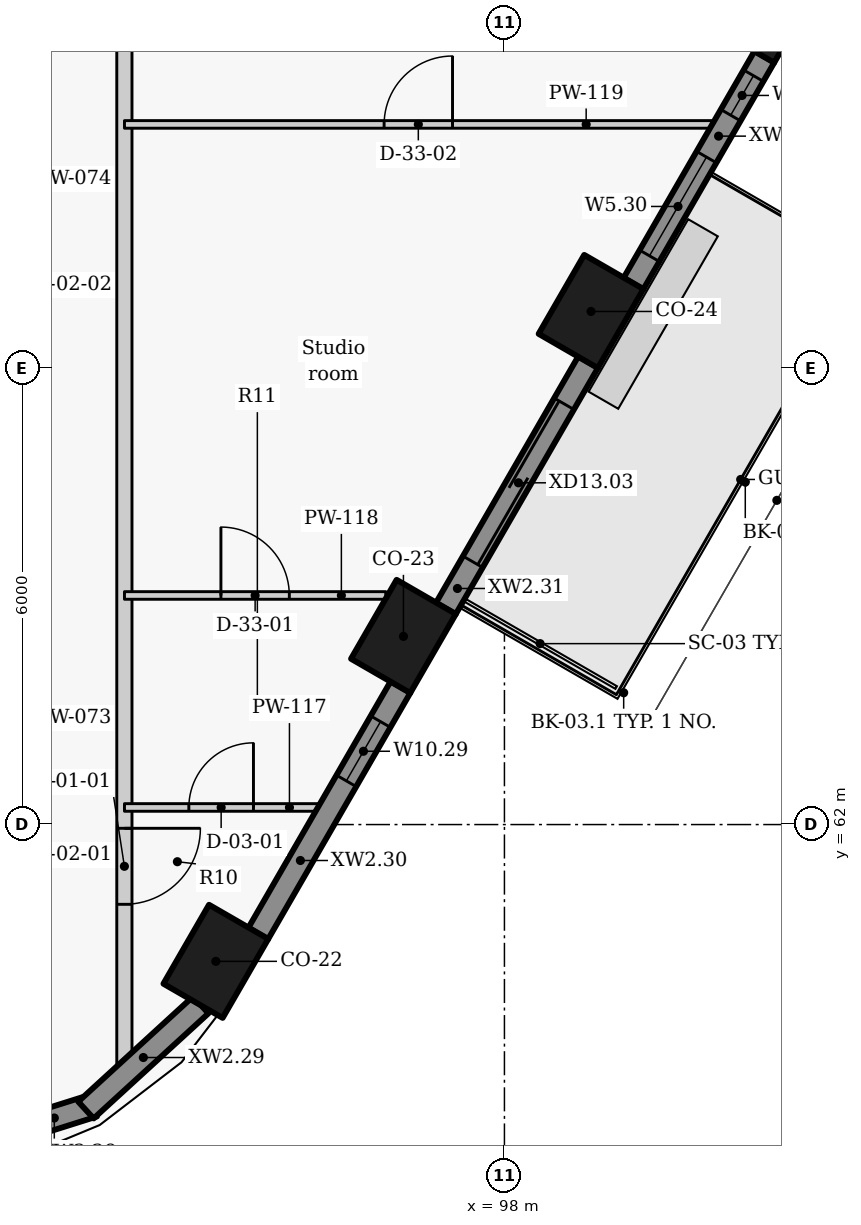
"""IFC4 building model, lengths in metres.
Left out: names, types, materials, properties, quantities, classifications, styles, units other than length and angle.
Written with IfcOpenShell. Run it as: python <this file> out.ifc"""

import sys

from ifc_helpers import new_model, si_unit, direction, frame, frame_2d, origin, origin_2d, place, context, subcontext, project, spatial, rectangle, extrude, element, fill, save


model = new_model("IFC4")
c1 = context("Model", 3, precision=1e-05, world=origin(), true_north=direction((0.0, 1.0)))
c2 = subcontext(c1, "Body", "Model", "MODEL_VIEW")
j1 = project(units=[si_unit("LENGTHUNIT", "METRE"), si_unit("PLANEANGLEUNIT", "RADIAN")], contexts=[c1])
p1 = place(None, origin())
s1 = spatial("IfcSite", under=j1, at=p1, CompositionType="ELEMENT")
p2 = place(p1, origin())
s2 = spatial("IfcBuilding", under=s1, at=p2, CompositionType="ELEMENT")
p3 = place(p2, frame((0.0, 0.0, 203.1)))
s3 = spatial("IfcBuildingStorey", under=s2, at=p3, CompositionType="ELEMENT", Elevation=203.1)
for number, where, z_axis, x_axis in (
    (1, (94.203, 60.2, 0.0), (0.0, 0.0, 1.0), (0.5, 0.866, 0.0)),
    (2, (96.671, 64.475, 0.0), (0.0, 0.0, 1.0), (0.5, 0.866, 0.0)),
    (3, (99.139, 68.75, 0.0), (0.0, 0.0, 1.0), (0.5, 0.866, 0.0)),
    (4, (101.459, 72.768, 0.0), (0.0, 0.0, 1.0), (0.5, 0.866, 0.0)),
):
    element("IfcColumn", number, at=place(p3, frame(where, z_axis=z_axis, x_axis=x_axis)), inside=s3, PredefinedType="COLUMN", context=c2, shape_type="SweptSolid", body=[
        extrude(rectangle(XDim=1.2, YDim=0.9, at=origin_2d()), origin(), (0.0, 0.0, 1.0), 3.3),
    ])
p4 = place(p3, frame((90.636, 57.685, 0.0), z_axis=(0.0, 0.0, 1.0), x_axis=(0.95368324118, 0.300812691707, 0.0)))
e5 = element("IfcWall", 5, at=p4, inside=s3, PredefinedType="SOLIDWALL", context=c2, shape_type="SweptSolid", body=[
    extrude(rectangle(XDim=2.053, YDim=0.3, at=frame_2d((1.027, 0.0))), origin(), (0.0, 0.0, 1.0), 2.425),
])
p5 = place(p4, frame((0.271, 0.0, 0.9)))
e6 = element("IfcOpeningElement", 6, at=p5, cuts=e5, PredefinedType="OPENING", context=c2, shape_type="SweptSolid", body=[
    extrude(rectangle(XDim=0.6, YDim=1.1, at=frame_2d((0.3, 0.55))), frame((0.0, 0.16, 0.0), z_axis=(0.0, -1.0, 0.0), x_axis=(1.0, 0.0, 0.0)), (0.0, 0.0, 1.0), 0.32),
])
p6 = place(p3, frame((92.494, 58.244, 0.0), z_axis=(0.0, 0.0, 1.0), x_axis=(0.73764876128, 0.675184645102, 0.0)))
e7 = element("IfcWall", 7, at=p6, inside=s3, PredefinedType="SOLIDWALL", context=c2, shape_type="SweptSolid", body=[
    extrude(rectangle(XDim=2.048, YDim=0.3, at=frame_2d((1.024, 0.0))), origin(), (0.0, 0.0, 1.0), 2.425),
])
p7 = place(p3, frame((94.761, 60.567, 0.0), z_axis=(0.0, 0.0, 1.0), x_axis=(0.499982088007, 0.866035745032, 0.0)))
e8 = element("IfcWall", 8, at=p7, inside=s3, PredefinedType="SOLIDWALL", context=c2, shape_type="SweptSolid", body=[
    extrude(rectangle(XDim=3.744, YDim=0.3, at=frame_2d((1.872, 0.0))), origin(), (0.0, 0.0, 1.0), 2.425),
])
p8 = place(p7, frame((2.319, 0.0, 1.5)))
e9 = element("IfcOpeningElement", 9, at=p8, cuts=e8, PredefinedType="OPENING", context=c2, shape_type="SweptSolid", body=[
    extrude(rectangle(XDim=0.9, YDim=0.5, at=frame_2d((0.45, 0.25))), frame((0.0, 0.16, 0.0), z_axis=(0.0, -1.0, 0.0), x_axis=(1.0, 0.0, 0.0)), (0.0, 0.0, 1.0), 0.32),
])
p9 = place(p3, frame((97.229, 64.842, 0.0), z_axis=(0.0, 0.0, 1.0), x_axis=(0.500059225181, 0.86599120741, 0.0)))
e10 = element("IfcWall", 10, at=p9, inside=s3, PredefinedType="SOLIDWALL", context=c2, shape_type="SweptSolid", body=[
    extrude(rectangle(XDim=3.744, YDim=0.3, at=frame_2d((1.872, 0.0))), origin(), (0.0, 0.0, 1.0), 2.425),
])
p10 = place(p9, frame((0.711, 0.0, 0.0)))
e11 = element("IfcOpeningElement", 11, at=p10, cuts=e10, PredefinedType="OPENING", context=c2, shape_type="SweptSolid", body=[
    extrude(rectangle(XDim=2.4, YDim=2.0, at=frame_2d((1.2, 1.0))), frame((0.0, 0.16, 0.0), z_axis=(0.0, -1.0, 0.0), x_axis=(1.0, 0.0, 0.0)), (0.0, 0.0, 1.0), 0.32),
])
p11 = place(p3, frame((99.697, 69.116, 0.0), z_axis=(0.0, 0.0, 1.0), x_axis=(0.499955427682, 0.866051136095, 0.0)))
e12 = element("IfcWall", 12, at=p11, inside=s3, PredefinedType="SOLIDWALL", context=c2, shape_type="SweptSolid", body=[
    extrude(rectangle(XDim=3.447, YDim=0.3, at=frame_2d((1.724, 0.0))), origin(), (0.0, 0.0, 1.0), 2.425),
])
p12 = place(p11, frame((0.422, 0.0, 0.9)))
e13 = element("IfcOpeningElement", 13, at=p12, cuts=e12, PredefinedType="OPENING", context=c2, shape_type="SweptSolid", body=[
    extrude(rectangle(XDim=1.5, YDim=1.1, at=frame_2d((0.75, 0.55))), frame((0.0, 0.16, 0.0), z_axis=(0.0, -1.0, 0.0), x_axis=(1.0, 0.0, 0.0)), (0.0, 0.0, 1.0), 0.32),
])
p13 = place(p11, frame((2.559, 0.0, 0.9)))
e14 = element("IfcOpeningElement", 14, at=p13, cuts=e12, PredefinedType="OPENING", context=c2, shape_type="SweptSolid", body=[
    extrude(rectangle(XDim=0.6, YDim=1.1, at=frame_2d((0.3, 0.55))), frame((0.0, 0.16, 0.0), z_axis=(0.0, -1.0, 0.0), x_axis=(1.0, 0.0, 0.0)), (0.0, 0.0, 1.0), 0.32),
])
p14 = place(p3, frame((93.0, 101.281, 0.0), z_axis=(0.0, 0.0, 1.0), x_axis=(0.0, -1.0, 0.0)))
e15 = element("IfcWall", 15, at=p14, inside=s3, PredefinedType="PARTITIONING", context=c2, shape_type="SweptSolid", body=[
    extrude(rectangle(XDim=42.606, YDim=0.2, at=frame_2d((21.303, 0.0))), origin(), (0.0, 0.0, 1.0), 2.405),
])
p15 = place(p14, frame((39.33, 0.0, 0.0)))
e16 = element("IfcOpeningElement", 16, at=p15, cuts=e15, PredefinedType="OPENING", context=c2, shape_type="SweptSolid", body=[
    extrude(rectangle(XDim=1.0, YDim=2.1, at=frame_2d((0.5, 1.05))), frame((0.0, 0.11, 0.0), z_axis=(0.0, -1.0, 0.0), x_axis=(1.0, 0.0, 0.0)), (0.0, 0.0, 1.0), 0.22),
])
p16 = place(p14, frame((26.005, 0.0, 0.0)))
e17 = element("IfcOpeningElement", 17, at=p16, cuts=e15, PredefinedType="OPENING", context=c2, shape_type="SweptSolid", body=[
    extrude(rectangle(XDim=1.0, YDim=2.1, at=frame_2d((0.5, 1.05))), frame((0.0, 0.11, 0.0), z_axis=(0.0, -1.0, 0.0), x_axis=(1.0, 0.0, 0.0)), (0.0, 0.0, 1.0), 0.22),
])
p17 = place(p14, frame((7.143, 0.0, 0.0)))
e18 = element("IfcOpeningElement", 18, at=p17, cuts=e15, PredefinedType="OPENING", context=c2, shape_type="SweptSolid", body=[
    extrude(rectangle(XDim=1.0, YDim=2.1, at=frame_2d((0.5, 1.05))), frame((0.0, 0.11, 0.0), z_axis=(0.0, -1.0, 0.0), x_axis=(1.0, 0.0, 0.0)), (0.0, 0.0, 1.0), 0.22),
])
p18 = place(p3, frame((93.001, 62.225, 0.0), z_axis=(0.0, 0.0, 1.0), x_axis=(1.0, 0.0, 0.0)))
e19 = element("IfcWall", 19, at=p18, inside=s3, PredefinedType="PARTITIONING", context=c2, shape_type="SweptSolid", body=[
    extrude(rectangle(XDim=2.544, YDim=0.1, at=frame_2d((1.272, 0.0))), origin(), (0.0, 0.0, 1.0), 2.405),
])
p19 = place(p18, frame((0.847, 0.0, 0.0)))
e20 = element("IfcOpeningElement", 20, at=p19, cuts=e19, PredefinedType="OPENING", context=c2, shape_type="SweptSolid", body=[
    extrude(rectangle(XDim=0.85, YDim=2.1, at=frame_2d((0.425, 1.05))), frame((0.0, 0.06, 0.0), z_axis=(0.0, -1.0, 0.0), x_axis=(1.0, 0.0, 0.0)), (0.0, 0.0, 1.0), 0.12),
])
p20 = place(p3, frame((93.001, 65.014, 0.0), z_axis=(0.0, 0.0, 1.0), x_axis=(1.0, 0.0, 0.0)))
e21 = element("IfcWall", 21, at=p20, inside=s3, PredefinedType="PARTITIONING", context=c2, shape_type="SweptSolid", body=[
    extrude(rectangle(XDim=3.438, YDim=0.1, at=frame_2d((1.719, 0.0))), origin(), (0.0, 0.0, 1.0), 3.025),
])
p21 = place(p20, frame((1.269, 0.0, 0.0)))
e22 = element("IfcOpeningElement", 22, at=p21, cuts=e21, PredefinedType="OPENING", context=c2, shape_type="SweptSolid", body=[
    extrude(rectangle(XDim=0.9, YDim=2.1, at=frame_2d((0.45, 1.05))), frame((0.0, 0.06, 0.0), z_axis=(0.0, -1.0, 0.0), x_axis=(1.0, 0.0, 0.0)), (0.0, 0.0, 1.0), 0.12),
])
p22 = place(p3, frame((93.001, 71.211, 0.0), z_axis=(0.0, 0.0, 1.0), x_axis=(1.0, 0.0, 0.0)))
e23 = element("IfcWall", 23, at=p22, inside=s3, PredefinedType="PARTITIONING", context=c2, shape_type="SweptSolid", body=[
    extrude(rectangle(XDim=7.732, YDim=0.1, at=frame_2d((3.866, 0.0))), origin(), (0.0, 0.0, 1.0), 2.405),
])
p23 = place(p22, frame((3.416, 0.0, 0.0)))
e24 = element("IfcOpeningElement", 24, at=p23, cuts=e23, PredefinedType="OPENING", context=c2, shape_type="SweptSolid", body=[
    extrude(rectangle(XDim=0.9, YDim=2.1, at=frame_2d((0.45, 1.05))), frame((0.0, 0.06, 0.0), z_axis=(0.0, -1.0, 0.0), x_axis=(1.0, 0.0, 0.0)), (0.0, 0.0, 1.0), 0.12),
])
p24 = place(p8, origin())
e25 = element("IfcWindow", 25, at=p24, inside=s3, PartitioningType="SINGLE_PANEL", PredefinedType="WINDOW", context=c2, shape_type="SweptSolid", body=[
    extrude(rectangle(XDim=0.9, YDim=0.5, at=frame_2d((0.45, 0.25))), frame((0.0, 0.03, 0.0), z_axis=(0.0, -1.0, 0.0), x_axis=(1.0, 0.0, 0.0)), (0.0, 0.0, 1.0), 0.06),
])
fill(e9, e25)
p25 = place(p10, origin())
e26 = element("IfcDoor", 26, at=p25, inside=s3, OperationType="DOUBLE_DOOR_SLIDING", PredefinedType="DOOR", context=c2, shape_type="SweptSolid", body=[
    extrude(rectangle(XDim=2.4, YDim=2.0, at=frame_2d((1.2, 1.0))), frame((0.0, 0.025, 0.0), z_axis=(0.0, -1.0, 0.0), x_axis=(1.0, 0.0, 0.0)), (0.0, 0.0, 1.0), 0.05),
])
fill(e11, e26)
p26 = place(p12, origin())
e27 = element("IfcWindow", 27, at=p26, inside=s3, PartitioningType="SINGLE_PANEL", PredefinedType="WINDOW", context=c2, shape_type="SweptSolid", body=[
    extrude(rectangle(XDim=1.5, YDim=1.1, at=frame_2d((0.75, 0.55))), frame((0.0, 0.03, 0.0), z_axis=(0.0, -1.0, 0.0), x_axis=(1.0, 0.0, 0.0)), (0.0, 0.0, 1.0), 0.06),
])
fill(e13, e27)
p27 = place(p13, origin())
e28 = element("IfcWindow", 28, at=p27, inside=s3, PartitioningType="SINGLE_PANEL", PredefinedType="WINDOW", context=c2, shape_type="SweptSolid", body=[
    extrude(rectangle(XDim=0.6, YDim=1.1, at=frame_2d((0.3, 0.55))), frame((0.0, 0.03, 0.0), z_axis=(0.0, -1.0, 0.0), x_axis=(1.0, 0.0, 0.0)), (0.0, 0.0, 1.0), 0.06),
])
fill(e14, e28)
p28 = place(p15, origin())
e29 = element("IfcDoor", 29, at=p28, inside=s3, OperationType="SINGLE_SWING_LEFT", PredefinedType="DOOR", context=c2, shape_type="SweptSolid", body=[
    extrude(rectangle(XDim=1.0, YDim=2.1, at=frame_2d((0.5, 1.05))), frame((0.0, 0.025, 0.0), z_axis=(0.0, -1.0, 0.0), x_axis=(1.0, 0.0, 0.0)), (0.0, 0.0, 1.0), 0.05),
])
fill(e16, e29)
p29 = place(p19, origin())
e30 = element("IfcDoor", 30, at=p29, inside=s3, OperationType="SINGLE_SWING_RIGHT", PredefinedType="DOOR", context=c2, shape_type="SweptSolid", body=[
    extrude(rectangle(XDim=0.85, YDim=2.1, at=frame_2d((0.425, 1.05))), frame((0.0, 0.025, 0.0), z_axis=(0.0, -1.0, 0.0), x_axis=(1.0, 0.0, 0.0)), (0.0, 0.0, 1.0), 0.05),
])
fill(e20, e30)
p30 = place(p21, origin())
e31 = element("IfcDoor", 31, at=p30, inside=s3, OperationType="SINGLE_SWING_LEFT", PredefinedType="DOOR", context=c2, shape_type="SweptSolid", body=[
    extrude(rectangle(XDim=0.9, YDim=2.1, at=frame_2d((0.45, 1.05))), frame((0.0, 0.025, 0.0), z_axis=(0.0, -1.0, 0.0), x_axis=(1.0, 0.0, 0.0)), (0.0, 0.0, 1.0), 0.05),
])
fill(e22, e31)
p31 = place(p23, origin())
e32 = element("IfcDoor", 32, at=p31, inside=s3, OperationType="SINGLE_SWING_RIGHT", PredefinedType="DOOR", context=c2, shape_type="SweptSolid", body=[
    extrude(rectangle(XDim=0.9, YDim=2.1, at=frame_2d((0.45, 1.05))), frame((0.0, 0.025, 0.0), z_axis=(0.0, -1.0, 0.0), x_axis=(1.0, 0.0, 0.0)), (0.0, 0.0, 1.0), 0.05),
])
fill(e24, e32)
save(model, sys.argv[1])
